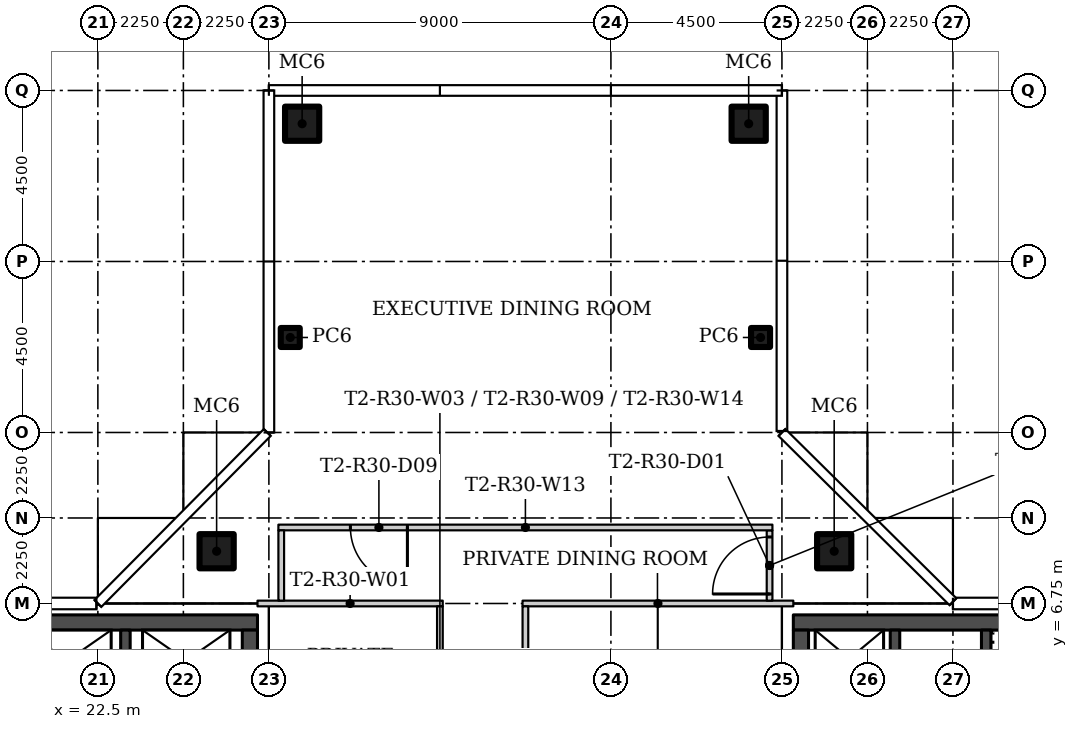
"""IFC4 building model, lengths in metres.
Left out: names, types, materials, properties, quantities, classifications, styles, units other than length and angle.
Written with IfcOpenShell. Run it as: python <this file> out.ifc"""

import sys

from ifc_helpers import new_model, si_unit, direction, frame, frame_2d, origin, origin_2d, place, context, subcontext, project, spatial, rectangle, hollow_rectangle, extrude, element, fill, save


model = new_model("IFC4")
c1 = context("Model", 3, precision=1e-05, world=origin(), true_north=direction((0.0, 1.0)))
c2 = subcontext(c1, "Body", "Model", "MODEL_VIEW")
j1 = project(units=[si_unit("LENGTHUNIT", "METRE"), si_unit("PLANEANGLEUNIT", "RADIAN")], contexts=[c1])
p1 = place(None, origin())
s1 = spatial("IfcSite", under=j1, at=p1, CompositionType="ELEMENT")
p2 = place(p1, origin())
s2 = spatial("IfcBuilding", under=s1, at=p2, CompositionType="ELEMENT")
p3 = place(p2, frame((0.0, 0.0, 269.4)))
s3 = spatial("IfcBuildingStorey", under=s2, at=p3, CompositionType="ELEMENT", Elevation=269.4)
for number, where in (
    (1, (25.625, 8.125, 0.0)),
    (2, (41.875, 8.125, 0.0)),
):
    element("IfcColumn", number, at=place(p3, frame(where)), inside=s3, PredefinedType="COLUMN", context=c2, shape_type="SweptSolid", body=[
        extrude(hollow_rectangle(XDim=0.9, YDim=0.9, WallThickness=0.036, at=origin_2d()), origin(), (0.0, 0.0, 1.0), 3.45),
    ])
p4 = place(p3, frame((39.938, 13.75, 0.0)))
e3 = element("IfcColumn", 3, at=p4, inside=s3, PredefinedType="COLUMN", context=c2, shape_type="SweptSolid", body=[
    extrude(hollow_rectangle(XDim=0.5, YDim=0.5, WallThickness=0.016, at=origin_2d()), origin(), (0.0, 0.0, 1.0), 3.45),
])
p5 = place(p3, frame((39.625, 19.375, 0.0)))
e4 = element("IfcColumn", 4, at=p5, inside=s3, PredefinedType="COLUMN", context=c2, shape_type="SweptSolid", body=[
    extrude(hollow_rectangle(XDim=0.9, YDim=0.9, WallThickness=0.036, at=origin_2d()), origin(), (0.0, 0.0, 1.0), 3.45),
])
p6 = place(p3, frame((27.562, 13.75, 0.0)))
e5 = element("IfcColumn", 5, at=p6, inside=s3, PredefinedType="COLUMN", context=c2, shape_type="SweptSolid", body=[
    extrude(hollow_rectangle(XDim=0.5, YDim=0.5, WallThickness=0.016, at=origin_2d()), origin(), (0.0, 0.0, 1.0), 3.45),
])
p7 = place(p3, frame((27.875, 19.375, 0.0)))
e6 = element("IfcColumn", 6, at=p7, inside=s3, PredefinedType="COLUMN", context=c2, shape_type="SweptSolid", body=[
    extrude(hollow_rectangle(XDim=0.9, YDim=0.9, WallThickness=0.036, at=origin_2d()), origin(), (0.0, 0.0, 1.0), 3.45),
])
p8 = place(p3, frame((31.575, 6.75, 0.0), z_axis=(0.0, 0.0, 1.0), x_axis=(-1.0, 0.0, 0.0)))
e7 = element("IfcWall", 7, at=p8, inside=s3, PredefinedType="PARTITIONING", context=c2, shape_type="SweptSolid", body=[
    extrude(rectangle(XDim=4.875, YDim=0.15, at=frame_2d((2.438, 0.0))), origin(), (0.0, 0.0, 1.0), 3.45),
])
p9 = place(p3, frame((40.8, 6.75, 0.0), z_axis=(0.0, 0.0, 1.0), x_axis=(-1.0, 0.0, 0.0)))
e8 = element("IfcWall", 8, at=p9, inside=s3, PredefinedType="PARTITIONING", context=c2, shape_type="SweptSolid", body=[
    extrude(rectangle(XDim=7.125, YDim=0.15, at=frame_2d((3.562, 0.0))), origin(), (0.0, 0.0, 1.0), 3.45),
])
p10 = place(p3, frame((31.5, 2.525, 0.0), z_axis=(0.0, 0.0, 1.0), x_axis=(0.0, 1.0, 0.0)))
e9 = element("IfcWall", 9, at=p10, inside=s3, PredefinedType="PARTITIONING", context=c2, shape_type="SweptSolid", body=[
    extrude(rectangle(XDim=4.15, YDim=0.15, at=frame_2d((2.075, 0.0))), origin(), (0.0, 0.0, 1.0), 3.45),
])
p11 = place(p10, frame((1.575, 0.0, 0.0)))
e10 = element("IfcOpeningElement", 10, at=p11, cuts=e9, PredefinedType="OPENING", context=c2, shape_type="SweptSolid", body=[
    extrude(rectangle(XDim=1.0, YDim=2.4, at=frame_2d((0.5, 1.2))), frame((0.0, 0.085, 0.0), z_axis=(0.0, -1.0, 0.0), x_axis=(1.0, 0.0, 0.0)), (0.0, 0.0, 1.0), 0.17),
])
p12 = place(p3, frame((33.75, 6.675, 0.0), z_axis=(0.0, 0.0, 1.0), x_axis=(0.0, -1.0, 0.0)))
e11 = element("IfcWall", 11, at=p12, inside=s3, PredefinedType="PARTITIONING", context=c2, shape_type="SweptSolid", body=[
    extrude(rectangle(XDim=4.15, YDim=0.15, at=frame_2d((2.075, 0.0))), origin(), (0.0, 0.0, 1.0), 3.45),
])
p13 = place(p12, frame((1.575, 0.0, 0.0)))
e12 = element("IfcOpeningElement", 12, at=p13, cuts=e11, PredefinedType="OPENING", context=c2, shape_type="SweptSolid", body=[
    extrude(rectangle(XDim=1.0, YDim=2.4, at=frame_2d((0.5, 1.2))), frame((0.0, 0.085, 0.0), z_axis=(0.0, -1.0, 0.0), x_axis=(1.0, 0.0, 0.0)), (0.0, 0.0, 1.0), 0.17),
])
p14 = place(p3, frame((40.175, 6.825, 0.0), z_axis=(0.0, 0.0, 1.0), x_axis=(0.0, 1.0, 0.0)))
e13 = element("IfcWall", 13, at=p14, inside=s3, PredefinedType="PARTITIONING", context=c2, shape_type="SweptSolid", body=[
    extrude(rectangle(XDim=1.85, YDim=0.15, at=frame_2d((0.925, 0.0))), origin(), (0.0, 0.0, 1.0), 3.45),
])
p15 = place(p14, frame((0.175, 0.0, 0.0)))
e14 = element("IfcOpeningElement", 14, at=p15, cuts=e13, PredefinedType="OPENING", context=c2, shape_type="SweptSolid", body=[
    extrude(rectangle(XDim=1.5, YDim=2.1, at=frame_2d((0.75, 1.05))), frame((0.0, 0.085, 0.0), z_axis=(0.0, -1.0, 0.0), x_axis=(1.0, 0.0, 0.0)), (0.0, 0.0, 1.0), 0.17),
])
p16 = place(p3, frame((40.25, 8.75, 0.0), z_axis=(0.0, 0.0, 1.0), x_axis=(-1.0, 0.0, 0.0)))
e15 = element("IfcWall", 15, at=p16, inside=s3, PredefinedType="PARTITIONING", context=c2, shape_type="SweptSolid", body=[
    extrude(rectangle(XDim=13.0, YDim=0.15, at=frame_2d((6.5, 0.0))), origin(), (0.0, 0.0, 1.0), 3.45),
])
p17 = place(p16, frame((9.605, 0.0, 0.0)))
e16 = element("IfcOpeningElement", 16, at=p17, cuts=e15, PredefinedType="OPENING", context=c2, shape_type="SweptSolid", body=[
    extrude(rectangle(XDim=1.5, YDim=2.1, at=frame_2d((0.75, 1.05))), frame((0.0, 0.085, 0.0), z_axis=(0.0, -1.0, 0.0), x_axis=(1.0, 0.0, 0.0)), (0.0, 0.0, 1.0), 0.17),
])
p18 = place(p3, frame((27.325, 8.675, 0.0), z_axis=(0.0, 0.0, 1.0), x_axis=(0.0, -1.0, 0.0)))
e17 = element("IfcWall", 17, at=p18, inside=s3, PredefinedType="PARTITIONING", context=c2, shape_type="SweptSolid", body=[
    extrude(rectangle(XDim=1.85, YDim=0.15, at=frame_2d((0.925, 0.0))), origin(), (0.0, 0.0, 1.0), 3.45),
])
p19 = place(p3, frame((13.8, 6.25, 0.0)))
e18 = element("IfcWall", 18, at=p19, inside=s3, PredefinedType="SHEAR", context=c2, shape_type="SweptSolid", body=[
    extrude(rectangle(XDim=12.9, YDim=0.4, at=frame_2d((6.45, 0.0))), origin(), (0.0, 0.0, 1.0), 3.45),
])
p20 = place(p3, frame((26.5, 6.05, 0.0), z_axis=(0.0, 0.0, 1.0), x_axis=(0.0, -1.0, 0.0)))
e19 = element("IfcWall", 19, at=p20, inside=s3, PredefinedType="SHEAR", context=c2, shape_type="SweptSolid", body=[
    extrude(rectangle(XDim=12.1, YDim=0.4, at=frame_2d((6.05, 0.0))), origin(), (0.0, 0.0, 1.0), 3.45),
])
p21 = place(p20, frame((10.1, 0.0, 0.0)))
e20 = element("IfcOpeningElement", 20, at=p21, cuts=e19, PredefinedType="OPENING", context=c2, shape_type="SweptSolid", body=[
    extrude(rectangle(XDim=1.2, YDim=2.1, at=frame_2d((0.6, 1.05))), frame((0.0, 0.21, 0.0), z_axis=(0.0, -1.0, 0.0), x_axis=(1.0, 0.0, 0.0)), (0.0, 0.0, 1.0), 0.42),
])
p22 = place(p20, frame((3.9, 0.0, 0.0)))
e21 = element("IfcOpeningElement", 21, at=p22, cuts=e19, PredefinedType="OPENING", context=c2, shape_type="SweptSolid", body=[
    extrude(rectangle(XDim=1.8, YDim=2.4, at=frame_2d((0.9, 1.2))), frame((0.0, 0.21, 0.0), z_axis=(0.0, -1.0, 0.0), x_axis=(1.0, 0.0, 0.0)), (0.0, 0.0, 1.0), 0.42),
])
p23 = place(p3, frame((23.225, 3.25, 0.0), z_axis=(0.0, 0.0, 1.0), x_axis=(0.0, 1.0, 0.0)))
e22 = element("IfcWall", 22, at=p23, inside=s3, PredefinedType="SHEAR", context=c2, shape_type="SweptSolid", body=[
    extrude(rectangle(XDim=2.8, YDim=0.25, at=frame_2d((1.4, 0.0))), origin(), (0.0, 0.0, 1.0), 3.45),
])
p24 = place(p3, frame((53.7, 6.25, 0.0), z_axis=(0.0, 0.0, 1.0), x_axis=(-1.0, 0.0, 0.0)))
e23 = element("IfcWall", 23, at=p24, inside=s3, PredefinedType="SHEAR", context=c2, shape_type="SweptSolid", body=[
    extrude(rectangle(XDim=12.9, YDim=0.4, at=frame_2d((6.45, 0.0))), origin(), (0.0, 0.0, 1.0), 3.45),
])
p25 = place(p3, frame((41.0, -6.05, 0.0), z_axis=(0.0, 0.0, 1.0), x_axis=(0.0, 1.0, 0.0)))
e24 = element("IfcWall", 24, at=p25, inside=s3, PredefinedType="SHEAR", context=c2, shape_type="SweptSolid", body=[
    extrude(rectangle(XDim=12.1, YDim=0.4, at=frame_2d((6.05, 0.0))), origin(), (0.0, 0.0, 1.0), 3.45),
])
p26 = place(p25, frame((0.8, 0.0, 0.0)))
e25 = element("IfcOpeningElement", 25, at=p26, cuts=e24, PredefinedType="OPENING", context=c2, shape_type="SweptSolid", body=[
    extrude(rectangle(XDim=1.2, YDim=2.1, at=frame_2d((0.6, 1.05))), frame((0.0, 0.21, 0.0), z_axis=(0.0, -1.0, 0.0), x_axis=(1.0, 0.0, 0.0)), (0.0, 0.0, 1.0), 0.42),
])
p27 = place(p25, frame((6.4, 0.0, 0.0)))
e26 = element("IfcOpeningElement", 26, at=p27, cuts=e24, PredefinedType="OPENING", context=c2, shape_type="SweptSolid", body=[
    extrude(rectangle(XDim=1.8, YDim=2.4, at=frame_2d((0.9, 1.2))), frame((0.0, 0.21, 0.0), z_axis=(0.0, -1.0, 0.0), x_axis=(1.0, 0.0, 0.0)), (0.0, 0.0, 1.0), 0.42),
])
for number, where, z_axis, x_axis in (
    (27, (45.875, 3.25, 0.0), (0.0, 0.0, 1.0), (0.0, 1.0, 0.0)),
    (28, (43.475, 3.25, 0.0), (0.0, 0.0, 1.0), (0.0, 1.0, 0.0)),
):
    element("IfcWall", number, at=place(p3, frame(where, z_axis=z_axis, x_axis=x_axis)), inside=s3, PredefinedType="SHEAR", context=c2, shape_type="SweptSolid", body=[
        extrude(rectangle(XDim=2.8, YDim=0.25, at=frame_2d((1.4, 0.0))), origin(), (0.0, 0.0, 1.0), 3.45),
    ])
p28 = place(p15, origin())
e29 = element("IfcDoor", 29, at=p28, inside=s3, OperationType="DOUBLE_DOOR_SINGLE_SWING", PredefinedType="DOOR", context=c2, shape_type="SweptSolid", body=[
    extrude(rectangle(XDim=1.5, YDim=2.1, at=frame_2d((0.75, 1.05))), frame((0.0, 0.025, 0.0), z_axis=(0.0, -1.0, 0.0), x_axis=(1.0, 0.0, 0.0)), (0.0, 0.0, 1.0), 0.05),
])
fill(e14, e29)
p29 = place(p17, origin())
e30 = element("IfcDoor", 30, at=p29, inside=s3, OperationType="DOUBLE_DOOR_SINGLE_SWING", PredefinedType="DOOR", context=c2, shape_type="SweptSolid", body=[
    extrude(rectangle(XDim=1.5, YDim=2.1, at=frame_2d((0.75, 1.05))), frame((0.0, 0.025, 0.0), z_axis=(0.0, -1.0, 0.0), x_axis=(1.0, 0.0, 0.0)), (0.0, 0.0, 1.0), 0.05),
])
fill(e16, e30)
save(model, sys.argv[1])
